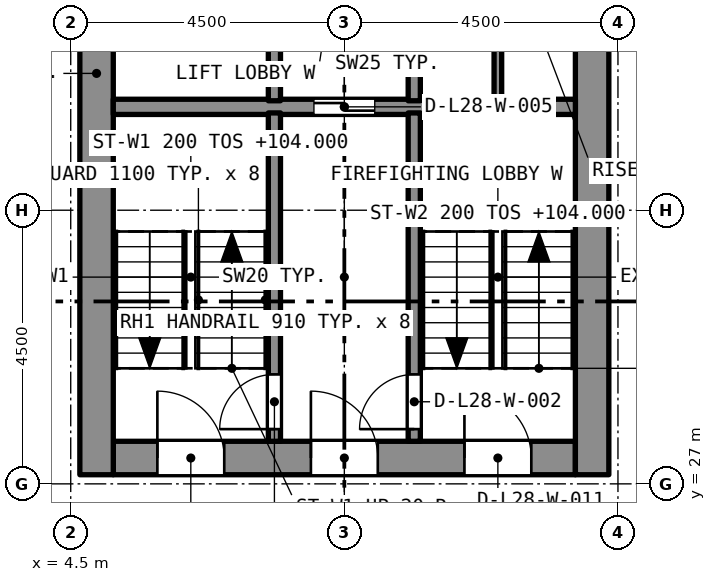
"""IFC4 building model, lengths in metres.
Left out: names, types, materials, properties, quantities, classifications, styles, units other than length and angle.
Written with IfcOpenShell. Run it as: python <this file> out.ifc"""

import sys

from ifc_helpers import new_model, si_unit, direction, frame, frame_2d, origin, place, context, subcontext, project, spatial, rectangle, extrude, element, fill, save


model = new_model("IFC4")
c1 = context("Model", 3, precision=1e-05, world=origin(), true_north=direction((0.0, 1.0)))
c2 = subcontext(c1, "Body", "Model", "MODEL_VIEW")
j1 = project(units=[si_unit("LENGTHUNIT", "METRE"), si_unit("PLANEANGLEUNIT", "RADIAN")], contexts=[c1])
p1 = place(None, origin())
s1 = spatial("IfcSite", under=j1, at=p1, CompositionType="ELEMENT")
p2 = place(p1, origin())
s2 = spatial("IfcBuilding", under=s1, at=p2, CompositionType="ELEMENT")
p3 = place(p2, frame((0.0, 0.0, 102.4)))
s3 = spatial("IfcBuildingStorey", under=s2, at=p3, CompositionType="ELEMENT", Elevation=102.4)
p4 = place(p3, frame((5.2, 27.425, 0.0), z_axis=(0.0, 0.0, 1.0), x_axis=(1.0, 0.0, 0.0)))
e1 = element("IfcWall", 1, at=p4, inside=s3, PredefinedType="SOLIDWALL", context=c2, shape_type="SweptSolid", body=[
    extrude(rectangle(XDim=7.6, YDim=0.55, at=frame_2d((3.8, 0.0))), origin(), (0.0, 0.0, 1.0), 3.2),
])
p5 = place(p4, frame((0.725, 0.0, 0.0)))
e2 = element("IfcOpeningElement", 2, at=p5, cuts=e1, PredefinedType="OPENING", context=c2, shape_type="SweptSolid", body=[
    extrude(rectangle(XDim=1.1, YDim=2.1, at=frame_2d((0.55, 1.05))), frame((0.0, 0.285, 0.0), z_axis=(0.0, -1.0, 0.0), x_axis=(1.0, 0.0, 0.0)), (0.0, 0.0, 1.0), 0.57),
])
p6 = place(p4, frame((3.25, 0.0, 0.0)))
e3 = element("IfcOpeningElement", 3, at=p6, cuts=e1, PredefinedType="OPENING", context=c2, shape_type="SweptSolid", body=[
    extrude(rectangle(XDim=1.1, YDim=2.1, at=frame_2d((0.55, 1.05))), frame((0.0, 0.285, 0.0), z_axis=(0.0, -1.0, 0.0), x_axis=(1.0, 0.0, 0.0)), (0.0, 0.0, 1.0), 0.57),
])
p7 = place(p4, frame((5.775, 0.0, 0.0)))
e4 = element("IfcOpeningElement", 4, at=p7, cuts=e1, PredefinedType="OPENING", context=c2, shape_type="SweptSolid", body=[
    extrude(rectangle(XDim=1.1, YDim=2.1, at=frame_2d((0.55, 1.05))), frame((0.0, 0.285, 0.0), z_axis=(0.0, -1.0, 0.0), x_axis=(1.0, 0.0, 0.0)), (0.0, 0.0, 1.0), 0.57),
])
p8 = place(p3, frame((4.925, 27.15, 0.0), z_axis=(0.0, 0.0, 1.0), x_axis=(0.0, 1.0, 0.0)))
e5 = element("IfcWall", 5, at=p8, inside=s3, PredefinedType="SOLIDWALL", context=c2, shape_type="SweptSolid", body=[
    extrude(rectangle(XDim=13.2, YDim=0.55, at=frame_2d((6.6, 0.0))), origin(), (0.0, 0.0, 1.0), 3.2),
])
p9 = place(p8, frame((8.8, 0.0, 0.0)))
e6 = element("IfcOpeningElement", 6, at=p9, cuts=e5, PredefinedType="OPENING", context=c2, shape_type="SweptSolid", body=[
    extrude(rectangle(XDim=1.2, YDim=2.1, at=frame_2d((0.6, 1.05))), frame((0.0, 0.285, 0.0), z_axis=(0.0, -1.0, 0.0), x_axis=(1.0, 0.0, 0.0)), (0.0, 0.0, 1.0), 0.57),
])
p10 = place(p3, frame((13.075, 27.15, 0.0), z_axis=(0.0, 0.0, 1.0), x_axis=(0.0, 1.0, 0.0)))
e7 = element("IfcWall", 7, at=p10, inside=s3, PredefinedType="SOLIDWALL", context=c2, shape_type="SweptSolid", body=[
    extrude(rectangle(XDim=13.2, YDim=0.55, at=frame_2d((6.6, 0.0))), origin(), (0.0, 0.0, 1.0), 3.2),
])
p11 = place(p10, frame((10.95, 0.0, 0.0)))
e8 = element("IfcOpeningElement", 8, at=p11, cuts=e7, PredefinedType="OPENING", context=c2, shape_type="SweptSolid", body=[
    extrude(rectangle(XDim=1.1, YDim=2.1, at=frame_2d((0.55, 1.05))), frame((0.0, 0.285, 0.0), z_axis=(0.0, -1.0, 0.0), x_axis=(1.0, 0.0, 0.0)), (0.0, 0.0, 1.0), 0.57),
])
p12 = place(p10, frame((8.8, 0.0, 0.0)))
e9 = element("IfcOpeningElement", 9, at=p12, cuts=e7, PredefinedType="OPENING", context=c2, shape_type="SweptSolid", body=[
    extrude(rectangle(XDim=1.2, YDim=2.1, at=frame_2d((0.6, 1.05))), frame((0.0, 0.285, 0.0), z_axis=(0.0, -1.0, 0.0), x_axis=(1.0, 0.0, 0.0)), (0.0, 0.0, 1.0), 0.57),
])
p13 = place(p3, frame((5.2, 33.2, 0.0), z_axis=(0.0, 0.0, 1.0), x_axis=(1.0, 0.0, 0.0)))
e10 = element("IfcWall", 10, at=p13, inside=s3, PredefinedType="SOLIDWALL", context=c2, shape_type="SweptSolid", body=[
    extrude(rectangle(XDim=7.6, YDim=0.25, at=frame_2d((3.8, 0.0))), origin(), (0.0, 0.0, 1.0), 2.9),
])
p14 = place(p13, frame((3.3, 0.0, 0.0)))
e11 = element("IfcOpeningElement", 11, at=p14, cuts=e10, PredefinedType="OPENING", context=c2, shape_type="SweptSolid", body=[
    extrude(rectangle(XDim=1.0, YDim=2.1, at=frame_2d((0.5, 1.05))), frame((0.0, 0.135, 0.0), z_axis=(0.0, -1.0, 0.0), x_axis=(1.0, 0.0, 0.0)), (0.0, 0.0, 1.0), 0.27),
])
p15 = place(p3, frame((7.85, 27.7, 0.0), z_axis=(0.0, 0.0, 1.0), x_axis=(0.0, 1.0, 0.0)))
e12 = element("IfcWall", 12, at=p15, inside=s3, PredefinedType="SOLIDWALL", context=c2, shape_type="SweptSolid", body=[
    extrude(rectangle(XDim=5.4, YDim=0.2, at=frame_2d((2.7, 0.0))), origin(), (0.0, 0.0, 1.0), 2.9),
])
p16 = place(p15, frame((0.2, 0.0, 0.0)))
e13 = element("IfcOpeningElement", 13, at=p16, cuts=e12, PredefinedType="OPENING", context=c2, shape_type="SweptSolid", body=[
    extrude(rectangle(XDim=0.9, YDim=2.1, at=frame_2d((0.45, 1.05))), frame((0.0, 0.11, 0.0), z_axis=(0.0, -1.0, 0.0), x_axis=(1.0, 0.0, 0.0)), (0.0, 0.0, 1.0), 0.22),
])
p17 = place(p3, frame((10.15, 27.7, 0.0), z_axis=(0.0, 0.0, 1.0), x_axis=(0.0, 1.0, 0.0)))
e14 = element("IfcWall", 14, at=p17, inside=s3, PredefinedType="SOLIDWALL", context=c2, shape_type="SweptSolid", body=[
    extrude(rectangle(XDim=5.4, YDim=0.2, at=frame_2d((2.7, 0.0))), origin(), (0.0, 0.0, 1.0), 2.9),
])
p18 = place(p17, frame((0.2, 0.0, 0.0)))
e15 = element("IfcOpeningElement", 15, at=p18, cuts=e14, PredefinedType="OPENING", context=c2, shape_type="SweptSolid", body=[
    extrude(rectangle(XDim=0.9, YDim=2.1, at=frame_2d((0.45, 1.05))), frame((0.0, 0.11, 0.0), z_axis=(0.0, -1.0, 0.0), x_axis=(1.0, 0.0, 0.0)), (0.0, 0.0, 1.0), 0.22),
])
for number, where, z_axis, x_axis in (
    (16, (7.85, 33.3, 0.0), (0.0, 0.0, 1.0), (0.0, 1.0, 0.0)),
    (17, (10.15, 33.3, 0.0), (0.0, 0.0, 1.0), (0.0, 1.0, 0.0)),
):
    element("IfcWall", number, at=place(p3, frame(where, z_axis=z_axis, x_axis=x_axis)), inside=s3, PredefinedType="SOLIDWALL", context=c2, shape_type="SweptSolid", body=[
        extrude(rectangle(XDim=2.3, YDim=0.2, at=frame_2d((1.15, 0.0))), origin(), (0.0, 0.0, 1.0), 2.9),
    ])
p19 = place(p3, frame((11.525, 33.3, 0.0), z_axis=(0.0, 0.0, 1.0), x_axis=(0.0, 1.0, 0.0)))
e18 = element("IfcWall", 18, at=p19, inside=s3, PredefinedType="PARTITIONING", context=c2, shape_type="SweptSolid", body=[
    extrude(rectangle(XDim=2.3, YDim=0.125, at=frame_2d((1.15, 0.0))), origin(), (0.0, 0.0, 1.0), 2.9),
])
p20 = place(p16, origin())
e19 = element("IfcDoor", 19, at=p20, inside=s3, OperationType="SINGLE_SWING_LEFT", PredefinedType="DOOR", context=c2, shape_type="SweptSolid", body=[
    extrude(rectangle(XDim=0.9, YDim=2.1, at=frame_2d((0.45, 1.05))), frame((0.0, 0.025, 0.0), z_axis=(0.0, -1.0, 0.0), x_axis=(1.0, 0.0, 0.0)), (0.0, 0.0, 1.0), 0.05),
])
fill(e13, e19)
p21 = place(p18, origin())
e20 = element("IfcDoor", 20, at=p21, inside=s3, OperationType="SINGLE_SWING_LEFT", PredefinedType="DOOR", context=c2, shape_type="SweptSolid", body=[
    extrude(rectangle(XDim=0.9, YDim=2.1, at=frame_2d((0.45, 1.05))), frame((0.0, 0.025, 0.0), z_axis=(0.0, -1.0, 0.0), x_axis=(1.0, 0.0, 0.0)), (0.0, 0.0, 1.0), 0.05),
])
fill(e15, e20)
p22 = place(p14, origin())
e21 = element("IfcDoor", 21, at=p22, inside=s3, OperationType="SLIDING_TO_LEFT", PredefinedType="DOOR", context=c2, shape_type="SweptSolid", body=[
    extrude(rectangle(XDim=1.0, YDim=2.1, at=frame_2d((0.5, 1.05))), frame((0.0, 0.025, 0.0), z_axis=(0.0, -1.0, 0.0), x_axis=(1.0, 0.0, 0.0)), (0.0, 0.0, 1.0), 0.05),
])
fill(e11, e21)
p23 = place(p5, origin())
e22 = element("IfcDoor", 22, at=p23, inside=s3, OperationType="SINGLE_SWING_LEFT", PredefinedType="DOOR", context=c2, shape_type="SweptSolid", body=[
    extrude(rectangle(XDim=1.1, YDim=2.1, at=frame_2d((0.55, 1.05))), frame((0.0, 0.025, 0.0), z_axis=(0.0, -1.0, 0.0), x_axis=(1.0, 0.0, 0.0)), (0.0, 0.0, 1.0), 0.05),
])
fill(e2, e22)
p24 = place(p6, origin())
e23 = element("IfcDoor", 23, at=p24, inside=s3, OperationType="SINGLE_SWING_LEFT", PredefinedType="DOOR", context=c2, shape_type="SweptSolid", body=[
    extrude(rectangle(XDim=1.1, YDim=2.1, at=frame_2d((0.55, 1.05))), frame((0.0, 0.025, 0.0), z_axis=(0.0, -1.0, 0.0), x_axis=(1.0, 0.0, 0.0)), (0.0, 0.0, 1.0), 0.05),
])
fill(e3, e23)
p25 = place(p7, origin())
e24 = element("IfcDoor", 24, at=p25, inside=s3, OperationType="SINGLE_SWING_LEFT", PredefinedType="DOOR", context=c2, shape_type="SweptSolid", body=[
    extrude(rectangle(XDim=1.1, YDim=2.1, at=frame_2d((0.55, 1.05))), frame((0.0, 0.025, 0.0), z_axis=(0.0, -1.0, 0.0), x_axis=(1.0, 0.0, 0.0)), (0.0, 0.0, 1.0), 0.05),
])
fill(e4, e24)
save(model, sys.argv[1])
